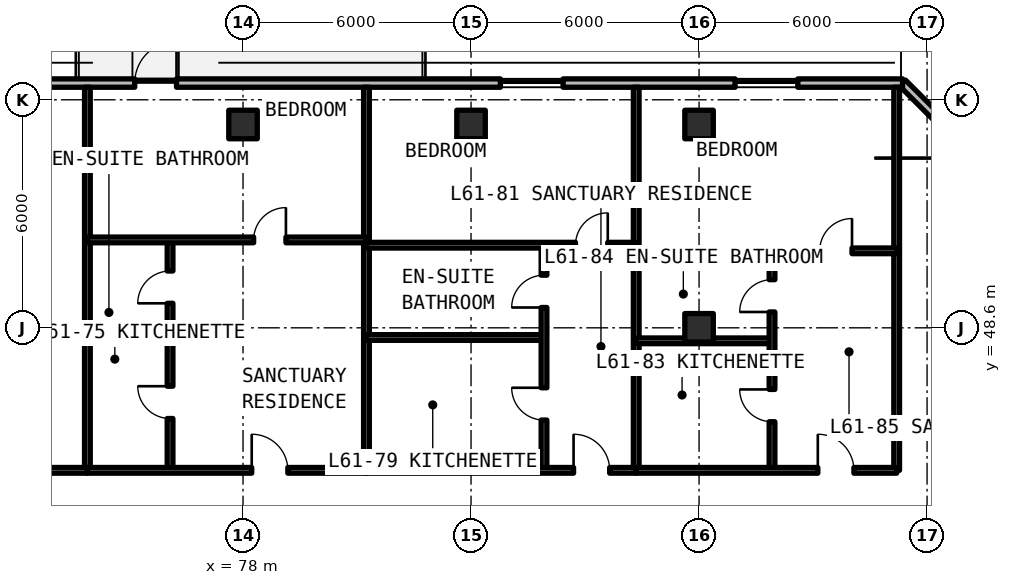
"""IFC4 building model, lengths in metres.
Left out: names, types, materials, properties, quantities, classifications, styles, units other than length and angle.
Written with IfcOpenShell. Run it as: python <this file> out.ifc"""

import sys

from ifc_helpers import new_model, si_unit, direction, frame, frame_2d, origin, origin_2d, place, context, subcontext, project, spatial, rectangle, extrude, element, fill, save


model = new_model("IFC4")
c1 = context("Model", 3, precision=1e-05, world=origin(), true_north=direction((0.0, 1.0)))
c2 = subcontext(c1, "Body", "Model", "MODEL_VIEW")
j1 = project(units=[si_unit("LENGTHUNIT", "METRE"), si_unit("PLANEANGLEUNIT", "RADIAN")], contexts=[c1])
p1 = place(None, origin())
s1 = spatial("IfcSite", under=j1, at=p1, CompositionType="ELEMENT")
p2 = place(p1, origin())
s2 = spatial("IfcBuilding", under=s1, at=p2, CompositionType="ELEMENT")
p3 = place(p2, frame((0.0, 0.0, 219.12)))
s3 = spatial("IfcBuildingStorey", under=s2, at=p3, CompositionType="ELEMENT", Elevation=219.12)
for number, where, z_axis, x_axis in (
    (1, (90.0, 48.6, 0.0), (0.0, 0.0, 1.0), (1.0, 0.0, 0.0)),
    (2, (78.0, 53.95, 0.0), (0.0, 0.0, 1.0), (1.0, 0.0, 0.0)),
    (3, (84.0, 53.95, 0.0), (0.0, 0.0, 1.0), (1.0, 0.0, 0.0)),
    (4, (90.0, 53.95, 0.0), (0.0, 0.0, 1.0), (1.0, 0.0, 0.0)),
):
    element("IfcColumn", number, at=place(p3, frame(where, z_axis=z_axis, x_axis=x_axis)), inside=s3, PredefinedType="COLUMN", context=c2, shape_type="SweptSolid", body=[
        extrude(rectangle(XDim=0.75, YDim=0.75, at=origin_2d()), origin(), (0.0, 0.0, 1.0), 3.63),
    ])
p4 = place(p3, frame((99.49, 50.904, 0.0), z_axis=(0.0, 0.0, 1.0), x_axis=(-0.707085909342, 0.707127652415, 0.0)))
e5 = element("IfcWall", 5, at=p4, inside=s3, PredefinedType="SOLIDWALL", context=c2, shape_type="SweptSolid", body=[
    extrude(rectangle(XDim=5.849, YDim=0.22, at=frame_2d((2.924, 0.0))), origin(), (0.0, 0.0, 1.0), 3.41),
])
p5 = place(p4, frame((1.224, 0.0, 0.78)))
e6 = element("IfcOpeningElement", 6, at=p5, cuts=e5, PredefinedType="OPENING", context=c2, shape_type="SweptSolid", body=[
    extrude(rectangle(XDim=3.4, YDim=1.66, at=frame_2d((1.7, 0.83))), frame((0.0, 0.12, 0.0), z_axis=(0.0, -1.0, 0.0), x_axis=(1.0, 0.0, 0.0)), (0.0, 0.0, 1.0), 0.24),
])
p6 = place(p3, frame((95.354, 55.04, 0.0), z_axis=(0.0, 0.0, 1.0), x_axis=(-1.0, 0.0, 0.0)))
e7 = element("IfcWall", 7, at=p6, inside=s3, PredefinedType="SOLIDWALL", context=c2, shape_type="SweptSolid", body=[
    extrude(rectangle(XDim=43.244, YDim=0.22, at=frame_2d((21.622, 0.0))), origin(), (0.0, 0.0, 1.0), 3.41),
])
p7 = place(p6, frame((26.454, 0.0, 0.0)))
e8 = element("IfcOpeningElement", 8, at=p7, cuts=e7, PredefinedType="OPENING", context=c2, shape_type="SweptSolid", body=[
    extrude(rectangle(XDim=1.1, YDim=2.15, at=frame_2d((0.55, 1.075))), frame((0.0, 0.12, 0.0), z_axis=(0.0, -1.0, 0.0), x_axis=(1.0, 0.0, 0.0)), (0.0, 0.0, 1.0), 0.24),
])
p8 = place(p6, frame((19.104, 0.0, 0.0)))
e9 = element("IfcOpeningElement", 9, at=p8, cuts=e7, PredefinedType="OPENING", context=c2, shape_type="SweptSolid", body=[
    extrude(rectangle(XDim=1.1, YDim=2.15, at=frame_2d((0.55, 1.075))), frame((0.0, 0.12, 0.0), z_axis=(0.0, -1.0, 0.0), x_axis=(1.0, 0.0, 0.0)), (0.0, 0.0, 1.0), 0.24),
])
p9 = place(p6, frame((38.86, 0.0, 0.78)))
e10 = element("IfcOpeningElement", 10, at=p9, cuts=e7, PredefinedType="OPENING", context=c2, shape_type="SweptSolid", body=[
    extrude(rectangle(XDim=1.65, YDim=1.66, at=frame_2d((0.825, 0.83))), frame((0.0, 0.12, 0.0), z_axis=(0.0, -1.0, 0.0), x_axis=(1.0, 0.0, 0.0)), (0.0, 0.0, 1.0), 0.24),
])
p10 = place(p6, frame((31.517, 0.0, 0.78)))
e11 = element("IfcOpeningElement", 11, at=p10, cuts=e7, PredefinedType="OPENING", context=c2, shape_type="SweptSolid", body=[
    extrude(rectangle(XDim=1.65, YDim=1.66, at=frame_2d((0.825, 0.83))), frame((0.0, 0.12, 0.0), z_axis=(0.0, -1.0, 0.0), x_axis=(1.0, 0.0, 0.0)), (0.0, 0.0, 1.0), 0.24),
])
p11 = place(p6, frame((8.932, 0.0, 0.78)))
e12 = element("IfcOpeningElement", 12, at=p11, cuts=e7, PredefinedType="OPENING", context=c2, shape_type="SweptSolid", body=[
    extrude(rectangle(XDim=1.65, YDim=1.66, at=frame_2d((0.825, 0.83))), frame((0.0, 0.12, 0.0), z_axis=(0.0, -1.0, 0.0), x_axis=(1.0, 0.0, 0.0)), (0.0, 0.0, 1.0), 0.24),
])
p12 = place(p6, frame((2.756, 0.0, 0.78)))
e13 = element("IfcOpeningElement", 13, at=p12, cuts=e7, PredefinedType="OPENING", context=c2, shape_type="SweptSolid", body=[
    extrude(rectangle(XDim=1.65, YDim=1.66, at=frame_2d((0.825, 0.83))), frame((0.0, 0.12, 0.0), z_axis=(0.0, -1.0, 0.0), x_axis=(1.0, 0.0, 0.0)), (0.0, 0.0, 1.0), 0.24),
])
for number, where, z_axis, x_axis in (
    (14, (95.2, 44.85, 0.0), (0.0, 0.0, 1.0), (0.0, 1.0, 0.0)),
    (15, (73.905, 44.85, 0.0), (0.0, 0.0, 1.0), (0.0, 1.0, 0.0)),
):
    element("IfcWall", number, at=place(p3, frame(where, z_axis=z_axis, x_axis=x_axis)), inside=s3, PredefinedType="SOLIDWALL", context=c2, shape_type="SweptSolid", body=[
        extrude(rectangle(XDim=10.08, YDim=0.15, at=frame_2d((5.04, 0.0))), origin(), (0.0, 0.0, 1.0), 2.63),
    ])
p13 = place(p3, frame((66.806, 44.85, 0.0), z_axis=(0.0, 0.0, 1.0), x_axis=(1.0, 0.0, 0.0)))
e16 = element("IfcWall", 16, at=p13, inside=s3, PredefinedType="SOLIDWALL", context=c2, shape_type="SweptSolid", body=[
    extrude(rectangle(XDim=7.098, YDim=0.15, at=frame_2d((3.549, 0.0))), origin(), (0.0, 0.0, 1.0), 2.63),
])
p14 = place(p13, frame((2.999, 0.0, 0.0)))
e17 = element("IfcOpeningElement", 17, at=p14, cuts=e16, PredefinedType="OPENING", context=c2, shape_type="SweptSolid", body=[
    extrude(rectangle(XDim=1.1, YDim=2.15, at=frame_2d((0.55, 1.075))), frame((0.0, 0.085, 0.0), z_axis=(0.0, -1.0, 0.0), x_axis=(1.0, 0.0, 0.0)), (0.0, 0.0, 1.0), 0.17),
])
p15 = place(p3, frame((81.248, 44.85, 0.0), z_axis=(0.0, 0.0, 1.0), x_axis=(0.0, 1.0, 0.0)))
e18 = element("IfcWall", 18, at=p15, inside=s3, PredefinedType="SOLIDWALL", context=c2, shape_type="SweptSolid", body=[
    extrude(rectangle(XDim=10.08, YDim=0.15, at=frame_2d((5.04, 0.0))), origin(), (0.0, 0.0, 1.0), 2.63),
])
p16 = place(p3, frame((73.905, 48.427, 0.0), z_axis=(0.0, 0.0, 1.0), x_axis=(1.0, 0.0, 0.0)))
e19 = element("IfcWall", 19, at=p16, inside=s3, PredefinedType="PARTITIONING", context=c2, shape_type="SweptSolid", body=[
    extrude(rectangle(XDim=2.175, YDim=0.15, at=frame_2d((1.088, 0.0))), origin(), (0.0, 0.0, 1.0), 2.63),
])
p17 = place(p3, frame((76.08, 44.85, 0.0), z_axis=(0.0, 0.0, 1.0), x_axis=(0.0, 1.0, 0.0)))
e20 = element("IfcWall", 20, at=p17, inside=s3, PredefinedType="PARTITIONING", context=c2, shape_type="SweptSolid", body=[
    extrude(rectangle(XDim=6.062, YDim=0.15, at=frame_2d((3.031, 0.0))), origin(), (0.0, 0.0, 1.0), 2.63),
])
p18 = place(p17, frame((1.364, 0.0, 0.0)))
e21 = element("IfcOpeningElement", 21, at=p18, cuts=e20, PredefinedType="OPENING", context=c2, shape_type="SweptSolid", body=[
    extrude(rectangle(XDim=0.85, YDim=2.1, at=frame_2d((0.425, 1.05))), frame((0.0, 0.085, 0.0), z_axis=(0.0, -1.0, 0.0), x_axis=(1.0, 0.0, 0.0)), (0.0, 0.0, 1.0), 0.17),
])
p19 = place(p17, frame((4.395, 0.0, 0.0)))
e22 = element("IfcOpeningElement", 22, at=p19, cuts=e20, PredefinedType="OPENING", context=c2, shape_type="SweptSolid", body=[
    extrude(rectangle(XDim=0.85, YDim=2.1, at=frame_2d((0.425, 1.05))), frame((0.0, 0.085, 0.0), z_axis=(0.0, -1.0, 0.0), x_axis=(1.0, 0.0, 0.0)), (0.0, 0.0, 1.0), 0.17),
])
p20 = place(p3, frame((73.905, 50.913, 0.0), z_axis=(0.0, 0.0, 1.0), x_axis=(1.0, 0.0, 0.0)))
e23 = element("IfcWall", 23, at=p20, inside=s3, PredefinedType="PARTITIONING", context=c2, shape_type="SweptSolid", body=[
    extrude(rectangle(XDim=7.343, YDim=0.15, at=frame_2d((3.672, 0.0))), origin(), (0.0, 0.0, 1.0), 2.63),
])
p21 = place(p20, frame((4.374, 0.0, 0.0)))
e24 = element("IfcOpeningElement", 24, at=p21, cuts=e23, PredefinedType="OPENING", context=c2, shape_type="SweptSolid", body=[
    extrude(rectangle(XDim=0.85, YDim=2.1, at=frame_2d((0.425, 1.05))), frame((0.0, 0.085, 0.0), z_axis=(0.0, -1.0, 0.0), x_axis=(1.0, 0.0, 0.0)), (0.0, 0.0, 1.0), 0.17),
])
p22 = place(p3, frame((73.905, 44.85, 0.0), z_axis=(0.0, 0.0, 1.0), x_axis=(1.0, 0.0, 0.0)))
e25 = element("IfcWall", 25, at=p22, inside=s3, PredefinedType="SOLIDWALL", context=c2, shape_type="SweptSolid", body=[
    extrude(rectangle(XDim=7.343, YDim=0.15, at=frame_2d((3.672, 0.0))), origin(), (0.0, 0.0, 1.0), 2.63),
])
p23 = place(p22, frame((4.324, 0.0, 0.0)))
e26 = element("IfcOpeningElement", 26, at=p23, cuts=e25, PredefinedType="OPENING", context=c2, shape_type="SweptSolid", body=[
    extrude(rectangle(XDim=0.95, YDim=2.15, at=frame_2d((0.475, 1.075))), frame((0.0, 0.085, 0.0), z_axis=(0.0, -1.0, 0.0), x_axis=(1.0, 0.0, 0.0)), (0.0, 0.0, 1.0), 0.17),
])
p24 = place(p3, frame((88.346, 44.85, 0.0), z_axis=(0.0, 0.0, 1.0), x_axis=(0.0, 1.0, 0.0)))
e27 = element("IfcWall", 27, at=p24, inside=s3, PredefinedType="SOLIDWALL", context=c2, shape_type="SweptSolid", body=[
    extrude(rectangle(XDim=10.08, YDim=0.15, at=frame_2d((5.04, 0.0))), origin(), (0.0, 0.0, 1.0), 2.63),
])
p25 = place(p3, frame((81.248, 48.345, 0.0), z_axis=(0.0, 0.0, 1.0), x_axis=(1.0, 0.0, 0.0)))
e28 = element("IfcWall", 28, at=p25, inside=s3, PredefinedType="PARTITIONING", context=c2, shape_type="SweptSolid", body=[
    extrude(rectangle(XDim=4.672, YDim=0.15, at=frame_2d((2.336, 0.0))), origin(), (0.0, 0.0, 1.0), 2.63),
])
p26 = place(p3, frame((85.92, 44.85, 0.0), z_axis=(0.0, 0.0, 1.0), x_axis=(0.0, 1.0, 0.0)))
e29 = element("IfcWall", 29, at=p26, inside=s3, PredefinedType="PARTITIONING", context=c2, shape_type="SweptSolid", body=[
    extrude(rectangle(XDim=5.924, YDim=0.15, at=frame_2d((2.962, 0.0))), origin(), (0.0, 0.0, 1.0), 2.63),
])
p27 = place(p26, frame((1.323, 0.0, 0.0)))
e30 = element("IfcOpeningElement", 30, at=p27, cuts=e29, PredefinedType="OPENING", context=c2, shape_type="SweptSolid", body=[
    extrude(rectangle(XDim=0.85, YDim=2.1, at=frame_2d((0.425, 1.05))), frame((0.0, 0.085, 0.0), z_axis=(0.0, -1.0, 0.0), x_axis=(1.0, 0.0, 0.0)), (0.0, 0.0, 1.0), 0.17),
])
p28 = place(p26, frame((4.285, 0.0, 0.0)))
e31 = element("IfcOpeningElement", 31, at=p28, cuts=e29, PredefinedType="OPENING", context=c2, shape_type="SweptSolid", body=[
    extrude(rectangle(XDim=0.85, YDim=2.1, at=frame_2d((0.425, 1.05))), frame((0.0, 0.085, 0.0), z_axis=(0.0, -1.0, 0.0), x_axis=(1.0, 0.0, 0.0)), (0.0, 0.0, 1.0), 0.17),
])
p29 = place(p3, frame((81.248, 50.774, 0.0), z_axis=(0.0, 0.0, 1.0), x_axis=(1.0, 0.0, 0.0)))
e32 = element("IfcWall", 32, at=p29, inside=s3, PredefinedType="PARTITIONING", context=c2, shape_type="SweptSolid", body=[
    extrude(rectangle(XDim=7.098, YDim=0.15, at=frame_2d((3.549, 0.0))), origin(), (0.0, 0.0, 1.0), 2.63),
])
p30 = place(p29, frame((5.5, 0.0, 0.0)))
e33 = element("IfcOpeningElement", 33, at=p30, cuts=e32, PredefinedType="OPENING", context=c2, shape_type="SweptSolid", body=[
    extrude(rectangle(XDim=0.85, YDim=2.1, at=frame_2d((0.425, 1.05))), frame((0.0, 0.085, 0.0), z_axis=(0.0, -1.0, 0.0), x_axis=(1.0, 0.0, 0.0)), (0.0, 0.0, 1.0), 0.17),
])
p31 = place(p3, frame((81.248, 44.85, 0.0), z_axis=(0.0, 0.0, 1.0), x_axis=(1.0, 0.0, 0.0)))
e34 = element("IfcWall", 34, at=p31, inside=s3, PredefinedType="SOLIDWALL", context=c2, shape_type="SweptSolid", body=[
    extrude(rectangle(XDim=7.098, YDim=0.15, at=frame_2d((3.549, 0.0))), origin(), (0.0, 0.0, 1.0), 2.63),
])
p32 = place(p31, frame((5.45, 0.0, 0.0)))
e35 = element("IfcOpeningElement", 35, at=p32, cuts=e34, PredefinedType="OPENING", context=c2, shape_type="SweptSolid", body=[
    extrude(rectangle(XDim=0.95, YDim=2.15, at=frame_2d((0.475, 1.075))), frame((0.0, 0.085, 0.0), z_axis=(0.0, -1.0, 0.0), x_axis=(1.0, 0.0, 0.0)), (0.0, 0.0, 1.0), 0.17),
])
p33 = place(p3, frame((88.346, 48.258, 0.0), z_axis=(0.0, 0.0, 1.0), x_axis=(1.0, 0.0, 0.0)))
e36 = element("IfcWall", 36, at=p33, inside=s3, PredefinedType="PARTITIONING", context=c2, shape_type="SweptSolid", body=[
    extrude(rectangle(XDim=3.573, YDim=0.15, at=frame_2d((1.787, 0.0))), origin(), (0.0, 0.0, 1.0), 2.63),
])
p34 = place(p3, frame((91.92, 44.85, 0.0), z_axis=(0.0, 0.0, 1.0), x_axis=(0.0, 1.0, 0.0)))
e37 = element("IfcWall", 37, at=p34, inside=s3, PredefinedType="PARTITIONING", context=c2, shape_type="SweptSolid", body=[
    extrude(rectangle(XDim=5.776, YDim=0.15, at=frame_2d((2.888, 0.0))), origin(), (0.0, 0.0, 1.0), 2.63),
])
p35 = place(p34, frame((1.279, 0.0, 0.0)))
e38 = element("IfcOpeningElement", 38, at=p35, cuts=e37, PredefinedType="OPENING", context=c2, shape_type="SweptSolid", body=[
    extrude(rectangle(XDim=0.85, YDim=2.1, at=frame_2d((0.425, 1.05))), frame((0.0, 0.085, 0.0), z_axis=(0.0, -1.0, 0.0), x_axis=(1.0, 0.0, 0.0)), (0.0, 0.0, 1.0), 0.17),
])
p36 = place(p34, frame((4.167, 0.0, 0.0)))
e39 = element("IfcOpeningElement", 39, at=p36, cuts=e37, PredefinedType="OPENING", context=c2, shape_type="SweptSolid", body=[
    extrude(rectangle(XDim=0.85, YDim=2.1, at=frame_2d((0.425, 1.05))), frame((0.0, 0.085, 0.0), z_axis=(0.0, -1.0, 0.0), x_axis=(1.0, 0.0, 0.0)), (0.0, 0.0, 1.0), 0.17),
])
p37 = place(p3, frame((88.346, 50.626, 0.0), z_axis=(0.0, 0.0, 1.0), x_axis=(1.0, 0.0, 0.0)))
e40 = element("IfcWall", 40, at=p37, inside=s3, PredefinedType="PARTITIONING", context=c2, shape_type="SweptSolid", body=[
    extrude(rectangle(XDim=6.854, YDim=0.15, at=frame_2d((3.427, 0.0))), origin(), (0.0, 0.0, 1.0), 2.63),
])
p38 = place(p37, frame((4.829, 0.0, 0.0)))
e41 = element("IfcOpeningElement", 41, at=p38, cuts=e40, PredefinedType="OPENING", context=c2, shape_type="SweptSolid", body=[
    extrude(rectangle(XDim=0.85, YDim=2.1, at=frame_2d((0.425, 1.05))), frame((0.0, 0.085, 0.0), z_axis=(0.0, -1.0, 0.0), x_axis=(1.0, 0.0, 0.0)), (0.0, 0.0, 1.0), 0.17),
])
p39 = place(p3, frame((88.346, 44.85, 0.0), z_axis=(0.0, 0.0, 1.0), x_axis=(1.0, 0.0, 0.0)))
e42 = element("IfcWall", 42, at=p39, inside=s3, PredefinedType="SOLIDWALL", context=c2, shape_type="SweptSolid", body=[
    extrude(rectangle(XDim=6.854, YDim=0.15, at=frame_2d((3.427, 0.0))), origin(), (0.0, 0.0, 1.0), 2.63),
])
p40 = place(p39, frame((4.779, 0.0, 0.0)))
e43 = element("IfcOpeningElement", 43, at=p40, cuts=e42, PredefinedType="OPENING", context=c2, shape_type="SweptSolid", body=[
    extrude(rectangle(XDim=0.95, YDim=2.15, at=frame_2d((0.475, 1.075))), frame((0.0, 0.085, 0.0), z_axis=(0.0, -1.0, 0.0), x_axis=(1.0, 0.0, 0.0)), (0.0, 0.0, 1.0), 0.17),
])
p41 = place(p8, frame((1.1, 0.0, 0.0), z_axis=(0.0, 0.0, 1.0), x_axis=(-1.0, 0.0, 0.0)))
e44 = element("IfcDoor", 44, at=p41, inside=s3, OperationType="SINGLE_SWING_LEFT", PredefinedType="DOOR", context=c2, shape_type="SweptSolid", body=[
    extrude(rectangle(XDim=1.1, YDim=2.15, at=frame_2d((0.55, 1.075))), frame((0.0, 0.025, 0.0), z_axis=(0.0, -1.0, 0.0), x_axis=(1.0, 0.0, 0.0)), (0.0, 0.0, 1.0), 0.05),
])
fill(e9, e44)
p42 = place(p11, origin())
e45 = element("IfcWindow", 45, at=p42, inside=s3, PartitioningType="SINGLE_PANEL", PredefinedType="WINDOW", context=c2, shape_type="SweptSolid", body=[
    extrude(rectangle(XDim=1.65, YDim=1.66, at=frame_2d((0.825, 0.83))), frame((0.0, 0.03, 0.0), z_axis=(0.0, -1.0, 0.0), x_axis=(1.0, 0.0, 0.0)), (0.0, 0.0, 1.0), 0.06),
])
fill(e12, e45)
p43 = place(p12, origin())
e46 = element("IfcWindow", 46, at=p43, inside=s3, PartitioningType="SINGLE_PANEL", PredefinedType="WINDOW", context=c2, shape_type="SweptSolid", body=[
    extrude(rectangle(XDim=1.65, YDim=1.66, at=frame_2d((0.825, 0.83))), frame((0.0, 0.03, 0.0), z_axis=(0.0, -1.0, 0.0), x_axis=(1.0, 0.0, 0.0)), (0.0, 0.0, 1.0), 0.06),
])
fill(e13, e46)
p44 = place(p18, origin())
e47 = element("IfcDoor", 47, at=p44, inside=s3, OperationType="SINGLE_SWING_RIGHT", PredefinedType="DOOR", context=c2, shape_type="SweptSolid", body=[
    extrude(rectangle(XDim=0.85, YDim=2.1, at=frame_2d((0.425, 1.05))), frame((0.0, 0.025, 0.0), z_axis=(0.0, -1.0, 0.0), x_axis=(1.0, 0.0, 0.0)), (0.0, 0.0, 1.0), 0.05),
])
fill(e21, e47)
p45 = place(p19, origin())
e48 = element("IfcDoor", 48, at=p45, inside=s3, OperationType="SINGLE_SWING_LEFT", PredefinedType="DOOR", context=c2, shape_type="SweptSolid", body=[
    extrude(rectangle(XDim=0.85, YDim=2.1, at=frame_2d((0.425, 1.05))), frame((0.0, 0.025, 0.0), z_axis=(0.0, -1.0, 0.0), x_axis=(1.0, 0.0, 0.0)), (0.0, 0.0, 1.0), 0.05),
])
fill(e22, e48)
p46 = place(p21, origin())
e49 = element("IfcDoor", 49, at=p46, inside=s3, OperationType="SINGLE_SWING_RIGHT", PredefinedType="DOOR", context=c2, shape_type="SweptSolid", body=[
    extrude(rectangle(XDim=0.85, YDim=2.1, at=frame_2d((0.425, 1.05))), frame((0.0, 0.025, 0.0), z_axis=(0.0, -1.0, 0.0), x_axis=(1.0, 0.0, 0.0)), (0.0, 0.0, 1.0), 0.05),
])
fill(e24, e49)
p47 = place(p23, origin())
e50 = element("IfcDoor", 50, at=p47, inside=s3, OperationType="SINGLE_SWING_LEFT", PredefinedType="DOOR", context=c2, shape_type="SweptSolid", body=[
    extrude(rectangle(XDim=0.95, YDim=2.15, at=frame_2d((0.475, 1.075))), frame((0.0, 0.025, 0.0), z_axis=(0.0, -1.0, 0.0), x_axis=(1.0, 0.0, 0.0)), (0.0, 0.0, 1.0), 0.05),
])
fill(e26, e50)
p48 = place(p27, origin())
e51 = element("IfcDoor", 51, at=p48, inside=s3, OperationType="SINGLE_SWING_RIGHT", PredefinedType="DOOR", context=c2, shape_type="SweptSolid", body=[
    extrude(rectangle(XDim=0.85, YDim=2.1, at=frame_2d((0.425, 1.05))), frame((0.0, 0.025, 0.0), z_axis=(0.0, -1.0, 0.0), x_axis=(1.0, 0.0, 0.0)), (0.0, 0.0, 1.0), 0.05),
])
fill(e30, e51)
p49 = place(p28, origin())
e52 = element("IfcDoor", 52, at=p49, inside=s3, OperationType="SINGLE_SWING_LEFT", PredefinedType="DOOR", context=c2, shape_type="SweptSolid", body=[
    extrude(rectangle(XDim=0.85, YDim=2.1, at=frame_2d((0.425, 1.05))), frame((0.0, 0.025, 0.0), z_axis=(0.0, -1.0, 0.0), x_axis=(1.0, 0.0, 0.0)), (0.0, 0.0, 1.0), 0.05),
])
fill(e31, e52)
p50 = place(p30, origin())
e53 = element("IfcDoor", 53, at=p50, inside=s3, OperationType="SINGLE_SWING_RIGHT", PredefinedType="DOOR", context=c2, shape_type="SweptSolid", body=[
    extrude(rectangle(XDim=0.85, YDim=2.1, at=frame_2d((0.425, 1.05))), frame((0.0, 0.025, 0.0), z_axis=(0.0, -1.0, 0.0), x_axis=(1.0, 0.0, 0.0)), (0.0, 0.0, 1.0), 0.05),
])
fill(e33, e53)
p51 = place(p32, origin())
e54 = element("IfcDoor", 54, at=p51, inside=s3, OperationType="SINGLE_SWING_LEFT", PredefinedType="DOOR", context=c2, shape_type="SweptSolid", body=[
    extrude(rectangle(XDim=0.95, YDim=2.15, at=frame_2d((0.475, 1.075))), frame((0.0, 0.025, 0.0), z_axis=(0.0, -1.0, 0.0), x_axis=(1.0, 0.0, 0.0)), (0.0, 0.0, 1.0), 0.05),
])
fill(e35, e54)
p52 = place(p35, origin())
e55 = element("IfcDoor", 55, at=p52, inside=s3, OperationType="SINGLE_SWING_RIGHT", PredefinedType="DOOR", context=c2, shape_type="SweptSolid", body=[
    extrude(rectangle(XDim=0.85, YDim=2.1, at=frame_2d((0.425, 1.05))), frame((0.0, 0.025, 0.0), z_axis=(0.0, -1.0, 0.0), x_axis=(1.0, 0.0, 0.0)), (0.0, 0.0, 1.0), 0.05),
])
fill(e38, e55)
p53 = place(p36, origin())
e56 = element("IfcDoor", 56, at=p53, inside=s3, OperationType="SINGLE_SWING_LEFT", PredefinedType="DOOR", context=c2, shape_type="SweptSolid", body=[
    extrude(rectangle(XDim=0.85, YDim=2.1, at=frame_2d((0.425, 1.05))), frame((0.0, 0.025, 0.0), z_axis=(0.0, -1.0, 0.0), x_axis=(1.0, 0.0, 0.0)), (0.0, 0.0, 1.0), 0.05),
])
fill(e39, e56)
p54 = place(p38, origin())
e57 = element("IfcDoor", 57, at=p54, inside=s3, OperationType="SINGLE_SWING_RIGHT", PredefinedType="DOOR", context=c2, shape_type="SweptSolid", body=[
    extrude(rectangle(XDim=0.85, YDim=2.1, at=frame_2d((0.425, 1.05))), frame((0.0, 0.025, 0.0), z_axis=(0.0, -1.0, 0.0), x_axis=(1.0, 0.0, 0.0)), (0.0, 0.0, 1.0), 0.05),
])
fill(e41, e57)
p55 = place(p40, origin())
e58 = element("IfcDoor", 58, at=p55, inside=s3, OperationType="SINGLE_SWING_LEFT", PredefinedType="DOOR", context=c2, shape_type="SweptSolid", body=[
    extrude(rectangle(XDim=0.95, YDim=2.15, at=frame_2d((0.475, 1.075))), frame((0.0, 0.025, 0.0), z_axis=(0.0, -1.0, 0.0), x_axis=(1.0, 0.0, 0.0)), (0.0, 0.0, 1.0), 0.05),
])
fill(e43, e58)
save(model, sys.argv[1])
